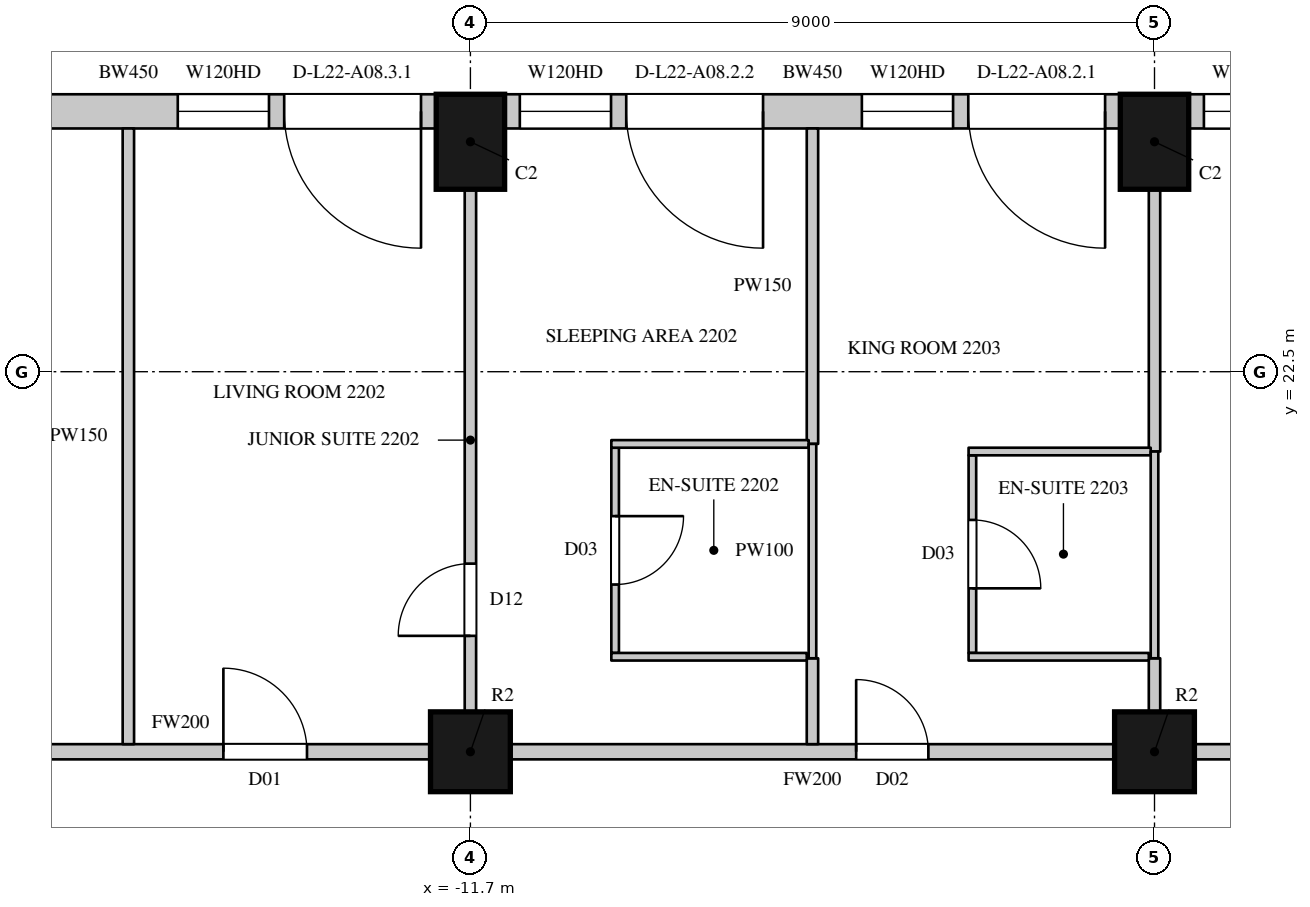
"""IFC4 building model, lengths in metres.
Left out: names, types, materials, properties, quantities, classifications, styles, units other than length and angle.
Written with IfcOpenShell. Run it as: python <this file> out.ifc"""

import sys

from ifc_helpers import new_model, si_unit, direction, frame, frame_2d, origin, origin_2d, place, context, subcontext, project, spatial, rectangle, circle, extrude, element, fill, save


model = new_model("IFC4")
c1 = context("Model", 3, precision=1e-05, world=origin(), true_north=direction((0.0, 1.0)))
c2 = subcontext(c1, "Body", "Model", "MODEL_VIEW")
j1 = project(units=[si_unit("LENGTHUNIT", "METRE"), si_unit("PLANEANGLEUNIT", "RADIAN")], contexts=[c1])
p1 = place(None, origin())
s1 = spatial("IfcSite", under=j1, at=p1, CompositionType="ELEMENT")
p2 = place(p1, origin())
s2 = spatial("IfcBuilding", under=s1, at=p2, CompositionType="ELEMENT")
p3 = place(p2, frame((0.0, 0.0, 109.5)))
s3 = spatial("IfcBuildingStorey", under=s2, at=p3, CompositionType="ELEMENT", Elevation=109.5)
for number, where, z_axis, x_axis in (
    (1, (-2.7, 25.525, 0.0), (0.0, 0.0, 1.0), (-1.0, 0.0, 0.0)),
    (2, (-11.7, 25.525, 0.0), (0.0, 0.0, 1.0), (-1.0, 0.0, 0.0)),
):
    element("IfcColumn", number, at=place(p3, frame(where, z_axis=z_axis, x_axis=x_axis)), inside=s3, PredefinedType="COLUMN", context=c2, shape_type="SweptSolid", body=[
        extrude(rectangle(XDim=0.9, YDim=1.25, at=origin_2d()), origin(), (0.0, 0.0, 1.0), 3.6),
    ])
for number, where, z_axis, x_axis in (
    (3, (-11.7, 17.5, 0.0), (0.0, 0.0, 1.0), (1.0, 0.0, 0.0)),
    (4, (-2.7, 17.5, 0.0), (0.0, 0.0, 1.0), (1.0, 0.0, 0.0)),
):
    element("IfcColumn", number, at=place(p3, frame(where, z_axis=z_axis, x_axis=x_axis)), inside=s3, PredefinedType="COLUMN", context=c2, shape_type="SweptSolid", body=[
        extrude(circle(Radius=0.525, at=origin_2d()), origin(), (0.0, 0.0, 1.0), 3.6),
    ])
p4 = place(p3, frame((5.85, 25.925, 0.0), z_axis=(0.0, 0.0, 1.0), x_axis=(-1.0, 0.0, 0.0)))
e5 = element("IfcWall", 5, at=p4, inside=s3, PredefinedType="SOLIDWALL", context=c2, shape_type="SweptSolid", body=[
    extrude(rectangle(XDim=8.1, YDim=0.45, at=frame_2d((4.05, 0.0))), origin(), (0.0, 0.0, 1.0), 3.3),
])
p5 = place(p4, frame((0.2, 0.0, 0.0)))
e6 = element("IfcOpeningElement", 6, at=p5, cuts=e5, PredefinedType="OPENING", context=c2, shape_type="SweptSolid", body=[
    extrude(rectangle(XDim=1.8, YDim=2.4, at=frame_2d((0.9, 1.2))), frame((0.0, 0.235, 0.0), z_axis=(0.0, -1.0, 0.0), x_axis=(1.0, 0.0, 0.0)), (0.0, 0.0, 1.0), 0.47),
])
p6 = place(p4, frame((2.2, 0.0, 1.05)))
e7 = element("IfcOpeningElement", 7, at=p6, cuts=e5, PredefinedType="OPENING", context=c2, shape_type="SweptSolid", body=[
    extrude(rectangle(XDim=1.2, YDim=2.0, at=frame_2d((0.6, 1.0))), frame((0.0, 0.235, 0.0), z_axis=(0.0, -1.0, 0.0), x_axis=(1.0, 0.0, 0.0)), (0.0, 0.0, 1.0), 0.47),
])
p7 = place(p4, frame((4.7, 0.0, 0.0)))
e8 = element("IfcOpeningElement", 8, at=p7, cuts=e5, PredefinedType="OPENING", context=c2, shape_type="SweptSolid", body=[
    extrude(rectangle(XDim=1.8, YDim=2.4, at=frame_2d((0.9, 1.2))), frame((0.0, 0.235, 0.0), z_axis=(0.0, -1.0, 0.0), x_axis=(1.0, 0.0, 0.0)), (0.0, 0.0, 1.0), 0.47),
])
p8 = place(p4, frame((6.7, 0.0, 1.05)))
e9 = element("IfcOpeningElement", 9, at=p8, cuts=e5, PredefinedType="OPENING", context=c2, shape_type="SweptSolid", body=[
    extrude(rectangle(XDim=1.2, YDim=2.0, at=frame_2d((0.6, 1.0))), frame((0.0, 0.235, 0.0), z_axis=(0.0, -1.0, 0.0), x_axis=(1.0, 0.0, 0.0)), (0.0, 0.0, 1.0), 0.47),
])
p9 = place(p3, frame((-3.15, 25.925, 0.0), z_axis=(0.0, 0.0, 1.0), x_axis=(-1.0, 0.0, 0.0)))
e10 = element("IfcWall", 10, at=p9, inside=s3, PredefinedType="SOLIDWALL", context=c2, shape_type="SweptSolid", body=[
    extrude(rectangle(XDim=8.1, YDim=0.45, at=frame_2d((4.05, 0.0))), origin(), (0.0, 0.0, 1.0), 3.3),
])
p10 = place(p9, frame((0.2, 0.0, 0.0)))
e11 = element("IfcOpeningElement", 11, at=p10, cuts=e10, PredefinedType="OPENING", context=c2, shape_type="SweptSolid", body=[
    extrude(rectangle(XDim=1.8, YDim=2.4, at=frame_2d((0.9, 1.2))), frame((0.0, 0.235, 0.0), z_axis=(0.0, -1.0, 0.0), x_axis=(1.0, 0.0, 0.0)), (0.0, 0.0, 1.0), 0.47),
])
p11 = place(p9, frame((2.2, 0.0, 1.05)))
e12 = element("IfcOpeningElement", 12, at=p11, cuts=e10, PredefinedType="OPENING", context=c2, shape_type="SweptSolid", body=[
    extrude(rectangle(XDim=1.2, YDim=2.0, at=frame_2d((0.6, 1.0))), frame((0.0, 0.235, 0.0), z_axis=(0.0, -1.0, 0.0), x_axis=(1.0, 0.0, 0.0)), (0.0, 0.0, 1.0), 0.47),
])
p12 = place(p9, frame((4.7, 0.0, 0.0)))
e13 = element("IfcOpeningElement", 13, at=p12, cuts=e10, PredefinedType="OPENING", context=c2, shape_type="SweptSolid", body=[
    extrude(rectangle(XDim=1.8, YDim=2.4, at=frame_2d((0.9, 1.2))), frame((0.0, 0.235, 0.0), z_axis=(0.0, -1.0, 0.0), x_axis=(1.0, 0.0, 0.0)), (0.0, 0.0, 1.0), 0.47),
])
p13 = place(p9, frame((6.7, 0.0, 1.05)))
e14 = element("IfcOpeningElement", 14, at=p13, cuts=e10, PredefinedType="OPENING", context=c2, shape_type="SweptSolid", body=[
    extrude(rectangle(XDim=1.2, YDim=2.0, at=frame_2d((0.6, 1.0))), frame((0.0, 0.235, 0.0), z_axis=(0.0, -1.0, 0.0), x_axis=(1.0, 0.0, 0.0)), (0.0, 0.0, 1.0), 0.47),
])
p14 = place(p3, frame((-12.15, 25.925, 0.0), z_axis=(0.0, 0.0, 1.0), x_axis=(-1.0, 0.0, 0.0)))
e15 = element("IfcWall", 15, at=p14, inside=s3, PredefinedType="SOLIDWALL", context=c2, shape_type="SweptSolid", body=[
    extrude(rectangle(XDim=8.1, YDim=0.45, at=frame_2d((4.05, 0.0))), origin(), (0.0, 0.0, 1.0), 3.3),
])
p15 = place(p14, frame((0.2, 0.0, 0.0)))
e16 = element("IfcOpeningElement", 16, at=p15, cuts=e15, PredefinedType="OPENING", context=c2, shape_type="SweptSolid", body=[
    extrude(rectangle(XDim=1.8, YDim=2.4, at=frame_2d((0.9, 1.2))), frame((0.0, 0.235, 0.0), z_axis=(0.0, -1.0, 0.0), x_axis=(1.0, 0.0, 0.0)), (0.0, 0.0, 1.0), 0.47),
])
p16 = place(p14, frame((2.2, 0.0, 1.05)))
e17 = element("IfcOpeningElement", 17, at=p16, cuts=e15, PredefinedType="OPENING", context=c2, shape_type="SweptSolid", body=[
    extrude(rectangle(XDim=1.2, YDim=2.0, at=frame_2d((0.6, 1.0))), frame((0.0, 0.235, 0.0), z_axis=(0.0, -1.0, 0.0), x_axis=(1.0, 0.0, 0.0)), (0.0, 0.0, 1.0), 0.47),
])
p17 = place(p14, frame((5.4, 0.0, 0.0)))
e18 = element("IfcOpeningElement", 18, at=p17, cuts=e15, PredefinedType="OPENING", context=c2, shape_type="SweptSolid", body=[
    extrude(rectangle(XDim=1.8, YDim=2.4, at=frame_2d((0.9, 1.2))), frame((0.0, 0.235, 0.0), z_axis=(0.0, -1.0, 0.0), x_axis=(1.0, 0.0, 0.0)), (0.0, 0.0, 1.0), 0.47),
])
p18 = place(p3, frame((-18.8, 17.5, 0.0), z_axis=(0.0, 0.0, 1.0), x_axis=(1.0, 0.0, 0.0)))
e19 = element("IfcWall", 19, at=p18, inside=s3, PredefinedType="PARTITIONING", context=c2, shape_type="SweptSolid", body=[
    extrude(rectangle(XDim=6.575, YDim=0.2, at=frame_2d((3.288, 0.0))), origin(), (0.0, 0.0, 1.0), 2.75),
])
p19 = place(p18, frame((3.85, 0.0, 0.0)))
e20 = element("IfcOpeningElement", 20, at=p19, cuts=e19, PredefinedType="OPENING", context=c2, shape_type="SweptSolid", body=[
    extrude(rectangle(XDim=1.1, YDim=2.4, at=frame_2d((0.55, 1.2))), frame((0.0, 0.11, 0.0), z_axis=(0.0, -1.0, 0.0), x_axis=(1.0, 0.0, 0.0)), (0.0, 0.0, 1.0), 0.22),
])
p20 = place(p3, frame((-11.175, 17.5, 0.0), z_axis=(0.0, 0.0, 1.0), x_axis=(1.0, 0.0, 0.0)))
e21 = element("IfcWall", 21, at=p20, inside=s3, PredefinedType="PARTITIONING", context=c2, shape_type="SweptSolid", body=[
    extrude(rectangle(XDim=7.95, YDim=0.2, at=frame_2d((3.975, 0.0))), origin(), (0.0, 0.0, 1.0), 2.75),
])
p21 = place(p20, frame((4.55, 0.0, 0.0)))
e22 = element("IfcOpeningElement", 22, at=p21, cuts=e21, PredefinedType="OPENING", context=c2, shape_type="SweptSolid", body=[
    extrude(rectangle(XDim=0.95, YDim=2.2, at=frame_2d((0.475, 1.1))), frame((0.0, 0.11, 0.0), z_axis=(0.0, -1.0, 0.0), x_axis=(1.0, 0.0, 0.0)), (0.0, 0.0, 1.0), 0.22),
])
p22 = place(p3, frame((-2.175, 17.5, 0.0), z_axis=(0.0, 0.0, 1.0), x_axis=(1.0, 0.0, 0.0)))
e23 = element("IfcWall", 23, at=p22, inside=s3, PredefinedType="PARTITIONING", context=c2, shape_type="SweptSolid", body=[
    extrude(rectangle(XDim=7.95, YDim=0.2, at=frame_2d((3.975, 0.0))), origin(), (0.0, 0.0, 1.0), 2.75),
])
p23 = place(p22, frame((1.65, 0.0, 0.0)))
e24 = element("IfcOpeningElement", 24, at=p23, cuts=e23, PredefinedType="OPENING", context=c2, shape_type="SweptSolid", body=[
    extrude(rectangle(XDim=1.1, YDim=2.4, at=frame_2d((0.55, 1.2))), frame((0.0, 0.11, 0.0), z_axis=(0.0, -1.0, 0.0), x_axis=(1.0, 0.0, 0.0)), (0.0, 0.0, 1.0), 0.22),
])
p24 = place(p3, frame((-16.2, 17.6, 0.0), z_axis=(0.0, 0.0, 1.0), x_axis=(0.0, 1.0, 0.0)))
e25 = element("IfcWall", 25, at=p24, inside=s3, PredefinedType="PARTITIONING", context=c2, shape_type="SweptSolid", body=[
    extrude(rectangle(XDim=8.1, YDim=0.15, at=frame_2d((4.05, 0.0))), origin(), (0.0, 0.0, 1.0), 2.65),
])
p25 = place(p3, frame((-11.7, 18.025, 0.0), z_axis=(0.0, 0.0, 1.0), x_axis=(0.0, 1.0, 0.0)))
e26 = element("IfcWall", 26, at=p25, inside=s3, PredefinedType="PARTITIONING", context=c2, shape_type="SweptSolid", body=[
    extrude(rectangle(XDim=6.875, YDim=0.15, at=frame_2d((3.438, 0.0))), origin(), (0.0, 0.0, 1.0), 2.75),
])
p26 = place(p25, frame((1.0, 0.0, 0.0)))
e27 = element("IfcOpeningElement", 27, at=p26, cuts=e26, PredefinedType="OPENING", context=c2, shape_type="SweptSolid", body=[
    extrude(rectangle(XDim=0.95, YDim=2.2, at=frame_2d((0.475, 1.1))), frame((0.0, 0.085, 0.0), z_axis=(0.0, -1.0, 0.0), x_axis=(1.0, 0.0, 0.0)), (0.0, 0.0, 1.0), 0.17),
])
p27 = place(p3, frame((-7.2, 17.6, 0.0), z_axis=(0.0, 0.0, 1.0), x_axis=(0.0, 1.0, 0.0)))
e28 = element("IfcWall", 28, at=p27, inside=s3, PredefinedType="PARTITIONING", context=c2, shape_type="SweptSolid", body=[
    extrude(rectangle(XDim=1.13, YDim=0.15, at=frame_2d((0.565, 0.0))), origin(), (0.0, 0.0, 1.0), 2.65),
])
p28 = place(p3, frame((-7.2, 21.55, 0.0), z_axis=(0.0, 0.0, 1.0), x_axis=(0.0, 1.0, 0.0)))
e29 = element("IfcWall", 29, at=p28, inside=s3, PredefinedType="PARTITIONING", context=c2, shape_type="SweptSolid", body=[
    extrude(rectangle(XDim=4.15, YDim=0.15, at=frame_2d((2.075, 0.0))), origin(), (0.0, 0.0, 1.0), 2.65),
])
p29 = place(p3, frame((-2.7, 18.025, 0.0), z_axis=(0.0, 0.0, 1.0), x_axis=(0.0, 1.0, 0.0)))
e30 = element("IfcWall", 30, at=p29, inside=s3, PredefinedType="PARTITIONING", context=c2, shape_type="SweptSolid", body=[
    extrude(rectangle(XDim=0.705, YDim=0.15, at=frame_2d((0.353, 0.0))), origin(), (0.0, 0.0, 1.0), 2.75),
])
p30 = place(p3, frame((-2.7, 21.45, 0.0), z_axis=(0.0, 0.0, 1.0), x_axis=(0.0, 1.0, 0.0)))
e31 = element("IfcWall", 31, at=p30, inside=s3, PredefinedType="PARTITIONING", context=c2, shape_type="SweptSolid", body=[
    extrude(rectangle(XDim=3.45, YDim=0.15, at=frame_2d((1.725, 0.0))), origin(), (0.0, 0.0, 1.0), 2.75),
])
p31 = place(p3, frame((-9.796, 18.8, 0.0), z_axis=(0.0, 0.0, 1.0), x_axis=(0.0, 1.0, 0.0)))
e32 = element("IfcWall", 32, at=p31, inside=s3, PredefinedType="PARTITIONING", context=c2, shape_type="SweptSolid", body=[
    extrude(rectangle(XDim=2.7, YDim=0.1, at=frame_2d((1.35, 0.0))), origin(), (0.0, 0.0, 1.0), 3.3),
])
p32 = place(p31, frame((0.9, 0.0, 0.0)))
e33 = element("IfcOpeningElement", 33, at=p32, cuts=e32, PredefinedType="OPENING", context=c2, shape_type="SweptSolid", body=[
    extrude(rectangle(XDim=0.9, YDim=2.2, at=frame_2d((0.45, 1.1))), frame((0.0, 0.06, 0.0), z_axis=(0.0, -1.0, 0.0), x_axis=(1.0, 0.0, 0.0)), (0.0, 0.0, 1.0), 0.12),
])
p33 = place(p3, frame((-9.846, 18.75, 0.0), z_axis=(0.0, 0.0, 1.0), x_axis=(1.0, 0.0, 0.0)))
e34 = element("IfcWall", 34, at=p33, inside=s3, PredefinedType="PARTITIONING", context=c2, shape_type="SweptSolid", body=[
    extrude(rectangle(XDim=2.571, YDim=0.1, at=frame_2d((1.286, 0.0))), origin(), (0.0, 0.0, 1.0), 3.3),
])
p34 = place(p3, frame((-9.846, 21.55, 0.0), z_axis=(0.0, 0.0, 1.0), x_axis=(1.0, 0.0, 0.0)))
e35 = element("IfcWall", 35, at=p34, inside=s3, PredefinedType="PARTITIONING", context=c2, shape_type="SweptSolid", body=[
    extrude(rectangle(XDim=2.596, YDim=0.1, at=frame_2d((1.298, 0.0))), origin(), (0.0, 0.0, 1.0), 3.3),
])
p35 = place(p3, frame((-7.2, 18.73, 0.0), z_axis=(0.0, 0.0, 1.0), x_axis=(0.0, 1.0, 0.0)))
e36 = element("IfcWall", 36, at=p35, inside=s3, PredefinedType="PARTITIONING", context=c2, shape_type="SweptSolid", body=[
    extrude(rectangle(XDim=2.82, YDim=0.1, at=frame_2d((1.41, 0.0))), origin(), (0.0, 0.0, 1.0), 2.65),
])
p36 = place(p3, frame((-5.096, 18.8, 0.0), z_axis=(0.0, 0.0, 1.0), x_axis=(0.0, 1.0, 0.0)))
e37 = element("IfcWall", 37, at=p36, inside=s3, PredefinedType="PARTITIONING", context=c2, shape_type="SweptSolid", body=[
    extrude(rectangle(XDim=2.6, YDim=0.1, at=frame_2d((1.3, 0.0))), origin(), (0.0, 0.0, 1.0), 3.3),
])
p37 = place(p36, frame((0.85, 0.0, 0.0)))
e38 = element("IfcOpeningElement", 38, at=p37, cuts=e37, PredefinedType="OPENING", context=c2, shape_type="SweptSolid", body=[
    extrude(rectangle(XDim=0.9, YDim=2.2, at=frame_2d((0.45, 1.1))), frame((0.0, 0.06, 0.0), z_axis=(0.0, -1.0, 0.0), x_axis=(1.0, 0.0, 0.0)), (0.0, 0.0, 1.0), 0.12),
])
p38 = place(p3, frame((-5.146, 18.75, 0.0), z_axis=(0.0, 0.0, 1.0), x_axis=(1.0, 0.0, 0.0)))
e39 = element("IfcWall", 39, at=p38, inside=s3, PredefinedType="PARTITIONING", context=c2, shape_type="SweptSolid", body=[
    extrude(rectangle(XDim=2.371, YDim=0.1, at=frame_2d((1.186, 0.0))), origin(), (0.0, 0.0, 1.0), 3.3),
])
p39 = place(p3, frame((-5.146, 21.45, 0.0), z_axis=(0.0, 0.0, 1.0), x_axis=(1.0, 0.0, 0.0)))
e40 = element("IfcWall", 40, at=p39, inside=s3, PredefinedType="PARTITIONING", context=c2, shape_type="SweptSolid", body=[
    extrude(rectangle(XDim=2.396, YDim=0.1, at=frame_2d((1.198, 0.0))), origin(), (0.0, 0.0, 1.0), 3.3),
])
p40 = place(p3, frame((-2.7, 18.73, 0.0), z_axis=(0.0, 0.0, 1.0), x_axis=(0.0, 1.0, 0.0)))
e41 = element("IfcWall", 41, at=p40, inside=s3, PredefinedType="PARTITIONING", context=c2, shape_type="SweptSolid", body=[
    extrude(rectangle(XDim=2.72, YDim=0.1, at=frame_2d((1.36, 0.0))), origin(), (0.0, 0.0, 1.0), 2.75),
])
p41 = place(p8, origin())
e42 = element("IfcWindow", 42, at=p41, inside=s3, PartitioningType="SINGLE_PANEL", PredefinedType="WINDOW", context=c2, shape_type="SweptSolid", body=[
    extrude(rectangle(XDim=1.2, YDim=2.0, at=frame_2d((0.6, 1.0))), frame((0.0, 0.135, 0.0), z_axis=(0.0, -1.0, 0.0), x_axis=(1.0, 0.0, 0.0)), (0.0, 0.0, 1.0), 0.06),
])
fill(e9, e42)
p42 = place(p10, origin())
e43 = element("IfcDoor", 43, at=p42, inside=s3, OperationType="SLIDING_TO_LEFT", PredefinedType="DOOR", context=c2, shape_type="SweptSolid", body=[
    extrude(rectangle(XDim=1.8, YDim=2.4, at=frame_2d((0.9, 1.2))), frame((0.0, 0.13, 0.0), z_axis=(0.0, -1.0, 0.0), x_axis=(1.0, 0.0, 0.0)), (0.0, 0.0, 1.0), 0.05),
])
fill(e11, e43)
p43 = place(p11, origin())
e44 = element("IfcWindow", 44, at=p43, inside=s3, PartitioningType="SINGLE_PANEL", PredefinedType="WINDOW", context=c2, shape_type="SweptSolid", body=[
    extrude(rectangle(XDim=1.2, YDim=2.0, at=frame_2d((0.6, 1.0))), frame((0.0, 0.135, 0.0), z_axis=(0.0, -1.0, 0.0), x_axis=(1.0, 0.0, 0.0)), (0.0, 0.0, 1.0), 0.06),
])
fill(e12, e44)
p44 = place(p12, origin())
e45 = element("IfcDoor", 45, at=p44, inside=s3, OperationType="SLIDING_TO_LEFT", PredefinedType="DOOR", context=c2, shape_type="SweptSolid", body=[
    extrude(rectangle(XDim=1.8, YDim=2.4, at=frame_2d((0.9, 1.2))), frame((0.0, 0.13, 0.0), z_axis=(0.0, -1.0, 0.0), x_axis=(1.0, 0.0, 0.0)), (0.0, 0.0, 1.0), 0.05),
])
fill(e13, e45)
p45 = place(p13, origin())
e46 = element("IfcWindow", 46, at=p45, inside=s3, PartitioningType="SINGLE_PANEL", PredefinedType="WINDOW", context=c2, shape_type="SweptSolid", body=[
    extrude(rectangle(XDim=1.2, YDim=2.0, at=frame_2d((0.6, 1.0))), frame((0.0, 0.135, 0.0), z_axis=(0.0, -1.0, 0.0), x_axis=(1.0, 0.0, 0.0)), (0.0, 0.0, 1.0), 0.06),
])
fill(e14, e46)
p46 = place(p15, origin())
e47 = element("IfcDoor", 47, at=p46, inside=s3, OperationType="SLIDING_TO_LEFT", PredefinedType="DOOR", context=c2, shape_type="SweptSolid", body=[
    extrude(rectangle(XDim=1.8, YDim=2.4, at=frame_2d((0.9, 1.2))), frame((0.0, 0.13, 0.0), z_axis=(0.0, -1.0, 0.0), x_axis=(1.0, 0.0, 0.0)), (0.0, 0.0, 1.0), 0.05),
])
fill(e16, e47)
p47 = place(p16, origin())
e48 = element("IfcWindow", 48, at=p47, inside=s3, PartitioningType="SINGLE_PANEL", PredefinedType="WINDOW", context=c2, shape_type="SweptSolid", body=[
    extrude(rectangle(XDim=1.2, YDim=2.0, at=frame_2d((0.6, 1.0))), frame((0.0, 0.135, 0.0), z_axis=(0.0, -1.0, 0.0), x_axis=(1.0, 0.0, 0.0)), (0.0, 0.0, 1.0), 0.06),
])
fill(e17, e48)
p48 = place(p19, origin())
e49 = element("IfcDoor", 49, at=p48, inside=s3, OperationType="SINGLE_SWING_LEFT", PredefinedType="DOOR", context=c2, shape_type="SweptSolid", body=[
    extrude(rectangle(XDim=1.1, YDim=2.4, at=frame_2d((0.55, 1.2))), frame((0.0, 0.025, 0.0), z_axis=(0.0, -1.0, 0.0), x_axis=(1.0, 0.0, 0.0)), (0.0, 0.0, 1.0), 0.05),
])
fill(e20, e49)
p49 = place(p26, origin())
e50 = element("IfcDoor", 50, at=p49, inside=s3, OperationType="SINGLE_SWING_LEFT", PredefinedType="DOOR", context=c2, shape_type="SweptSolid", body=[
    extrude(rectangle(XDim=0.95, YDim=2.2, at=frame_2d((0.475, 1.1))), frame((0.0, 0.025, 0.0), z_axis=(0.0, -1.0, 0.0), x_axis=(1.0, 0.0, 0.0)), (0.0, 0.0, 1.0), 0.05),
])
fill(e27, e50)
p50 = place(p32, origin())
e51 = element("IfcDoor", 51, at=p50, inside=s3, OperationType="SINGLE_SWING_LEFT", PredefinedType="DOOR", context=c2, shape_type="SweptSolid", body=[
    extrude(rectangle(XDim=0.9, YDim=2.2, at=frame_2d((0.45, 1.1))), frame((0.0, 0.025, 0.0), z_axis=(0.0, -1.0, 0.0), x_axis=(1.0, 0.0, 0.0)), (0.0, 0.0, 1.0), 0.05),
])
fill(e33, e51)
p51 = place(p21, origin())
e52 = element("IfcDoor", 52, at=p51, inside=s3, OperationType="SINGLE_SWING_LEFT", PredefinedType="DOOR", context=c2, shape_type="SweptSolid", body=[
    extrude(rectangle(XDim=0.95, YDim=2.2, at=frame_2d((0.475, 1.1))), frame((0.0, 0.025, 0.0), z_axis=(0.0, -1.0, 0.0), x_axis=(1.0, 0.0, 0.0)), (0.0, 0.0, 1.0), 0.05),
])
fill(e22, e52)
p52 = place(p37, origin())
e53 = element("IfcDoor", 53, at=p52, inside=s3, OperationType="SINGLE_SWING_RIGHT", PredefinedType="DOOR", context=c2, shape_type="SweptSolid", body=[
    extrude(rectangle(XDim=0.9, YDim=2.2, at=frame_2d((0.45, 1.1))), frame((0.0, 0.025, 0.0), z_axis=(0.0, -1.0, 0.0), x_axis=(1.0, 0.0, 0.0)), (0.0, 0.0, 1.0), 0.05),
])
fill(e38, e53)
save(model, sys.argv[1])
